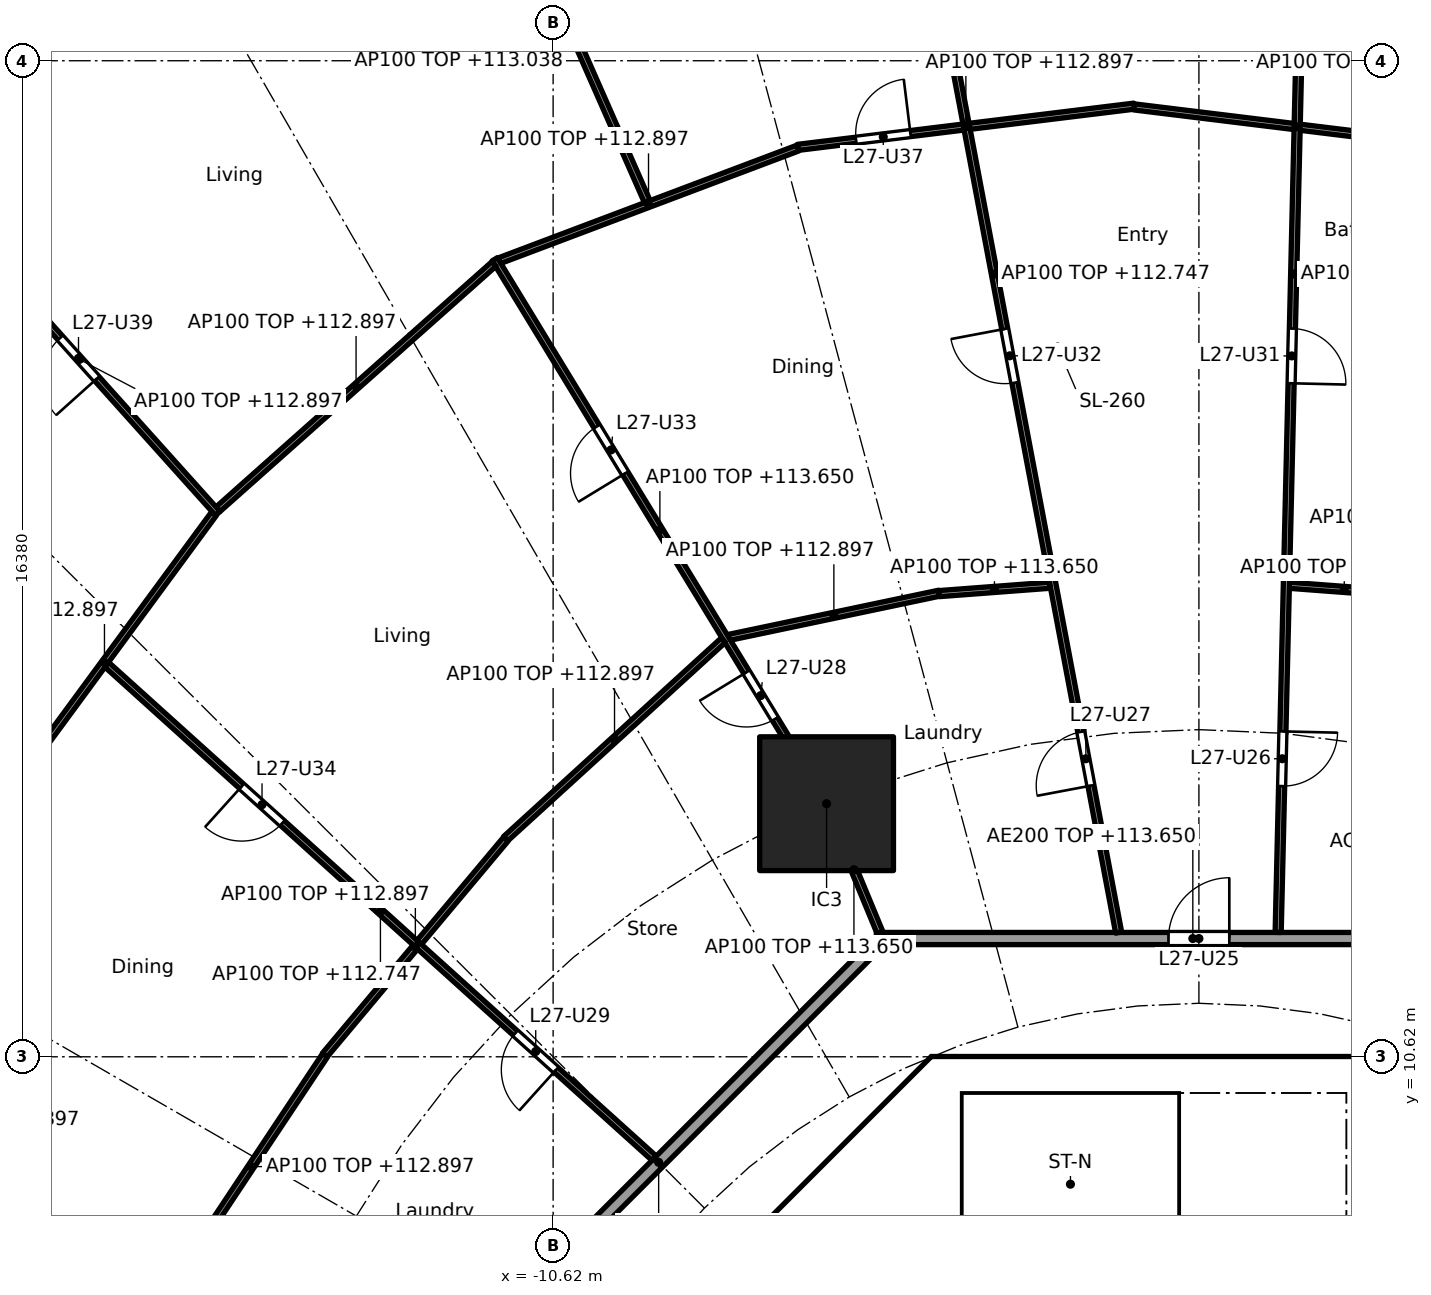
"""IFC4 building model, lengths in metres.
Left out: names, types, materials, properties, quantities, classifications, styles, units other than length and angle.
Written with IfcOpenShell. Run it as: python <this file> out.ifc"""

import sys

from ifc_helpers import new_model, si_unit, direction, frame, frame_2d, origin, origin_2d, place, context, subcontext, project, spatial, polyline, rectangle, outline, extrude, element, fill, save


model = new_model("IFC4")
c1 = context("Model", 3, precision=1e-05, world=origin(), true_north=direction((0.0, 1.0)))
c2 = subcontext(c1, "Body", "Model", "MODEL_VIEW")
j1 = project(units=[si_unit("LENGTHUNIT", "METRE"), si_unit("PLANEANGLEUNIT", "RADIAN")], contexts=[c1])
p1 = place(None, origin())
s1 = spatial("IfcSite", under=j1, at=p1, CompositionType="ELEMENT")
p2 = place(p1, origin())
s2 = spatial("IfcBuilding", under=s1, at=p2, CompositionType="ELEMENT")
p3 = place(p2, frame((0.0, 0.0, 110.3)))
s3 = spatial("IfcBuildingStorey", under=s2, at=p3, CompositionType="ELEMENT", Elevation=110.3)
p4 = place(p3, frame((-6.123, 14.782, 0.0), z_axis=(0.0, 0.0, 1.0), x_axis=(1.0, 0.0, 0.0)))
e1 = element("IfcColumn", 1, at=p4, inside=s3, PredefinedType="COLUMN", context=c2, shape_type="SweptSolid", body=[
    extrude(rectangle(XDim=2.2, YDim=2.2, at=origin_2d()), origin(), (0.0, 0.0, 1.0), 3.7),
])
p5 = place(p3, frame((-4.613, 9.988, 0.0), z_axis=(0.0, 0.0, 1.0), x_axis=(-0.707106781187, -0.707106781187, 0.0)))
e2 = element("IfcWall", 2, at=p5, inside=s3, PredefinedType="SHEAR", context=c2, shape_type="SweptSolid", body=[
    extrude(rectangle(XDim=7.602, YDim=0.6, at=frame_2d((3.801, 0.0))), origin(), (0.0, 0.0, 1.0), 3.35),
])
p6 = place(p5, frame((0.351, 0.0, 0.0)))
e3 = element("IfcOpeningElement", 3, at=p6, cuts=e2, PredefinedType="OPENING", context=c2, shape_type="SweptSolid", body=[
    extrude(rectangle(XDim=1.1, YDim=2.1, at=frame_2d((0.55, 1.05))), frame((0.0, 0.31, 0.0), z_axis=(0.0, -1.0, 0.0), x_axis=(1.0, 0.0, 0.0)), (0.0, 0.0, 1.0), 0.62),
])
p7 = place(p3, frame((-5.8, 4.3, 0.0), z_axis=(0.0, 0.0, 1.0), x_axis=(0.0, 1.0, 0.0)))
e4 = element("IfcWall", 4, at=p7, inside=s3, PredefinedType="PARTITIONING", context=c2, shape_type="SweptSolid", body=[
    extrude(rectangle(XDim=3.927, YDim=0.15, at=frame_2d((1.963, 0.0))), origin(), (0.0, 0.0, 1.0), 3.35),
])
p8 = place(p7, frame((0.413, 0.0, 0.0)))
e5 = element("IfcOpeningElement", 5, at=p8, cuts=e4, PredefinedType="OPENING", context=c2, shape_type="SweptSolid", body=[
    extrude(rectangle(XDim=0.9, YDim=2.1, at=frame_2d((0.45, 1.05))), frame((0.0, 0.085, 0.0), z_axis=(0.0, -1.0, 0.0), x_axis=(1.0, 0.0, 0.0)), (0.0, 0.0, 1.0), 0.17),
])
p9 = place(p7, frame((2.489, 0.0, 0.0)))
e6 = element("IfcOpeningElement", 6, at=p9, cuts=e4, PredefinedType="OPENING", context=c2, shape_type="SweptSolid", body=[
    extrude(rectangle(XDim=0.9, YDim=2.1, at=frame_2d((0.45, 1.05))), frame((0.0, 0.085, 0.0), z_axis=(0.0, -1.0, 0.0), x_axis=(1.0, 0.0, 0.0)), (0.0, 0.0, 1.0), 0.17),
])
p10 = place(p3, origin())
e7 = element("IfcWall", 7, at=p10, inside=s3, PredefinedType="SHEAR", context=c2, shape_type="SweptSolid", body=[
    extrude(outline(polyline([(-4.152, 10.025), (-4.401, 9.776), (-4.825, 10.2), (-4.401, 10.625), (4.401, 10.625), (4.825, 10.2), (4.401, 9.776), (4.152, 10.025), (-4.152, 10.025)])), origin(), (0.0, 0.0, 1.0), 3.35),
])
p11 = place(p3, origin())
e8 = element("IfcWall", 8, at=p11, inside=s3, PredefinedType="SOLIDWALL", context=c2, shape_type="SweptSolid", body=[
    extrude(outline(polyline([(-3.9, 7.025), (-4.1, 7.025), (-4.1, 10.025), (-3.9, 10.025), (-3.9, 7.025)])), origin(), (0.0, 0.0, 1.0), 3.35),
])
p12 = place(p3, frame((-14.829, 6.14, 0.0), z_axis=(0.0, 0.0, 1.0), x_axis=(-0.936597324342, 0.35040755134, 0.0)))
e9 = element("IfcWall", 9, at=p12, inside=s3, PredefinedType="PARTITIONING", context=c2, shape_type="SweptSolid", body=[
    extrude(rectangle(XDim=13.606, YDim=0.2, at=frame_2d((6.803, 0.0))), origin(), (0.0, 0.0, 1.0), 2.597),
])
p13 = place(p3, frame((5.104, 12.565, 0.0), z_axis=(0.0, 0.0, 1.0), x_axis=(-1.0, 0.0, 0.0)))
e10 = element("IfcWall", 10, at=p13, inside=s3, PredefinedType="PARTITIONING", context=c2, shape_type="SweptSolid", body=[
    extrude(rectangle(XDim=10.409, YDim=0.2, at=frame_2d((5.205, 0.0))), origin(), (0.0, 0.0, 1.0), 3.35),
])
p14 = place(p13, frame((4.604, 0.0, 0.0)))
e11 = element("IfcOpeningElement", 11, at=p14, cuts=e10, PredefinedType="OPENING", context=c2, shape_type="SweptSolid", body=[
    extrude(rectangle(XDim=1.0, YDim=2.1, at=frame_2d((0.5, 1.05))), frame((0.0, 0.11, 0.0), z_axis=(0.0, -1.0, 0.0), x_axis=(1.0, 0.0, 0.0)), (0.0, 0.0, 1.0), 0.22),
])
p15 = place(p3, frame((-5.275, 12.494, 0.0), z_axis=(0.0, 0.0, 1.0), x_axis=(-0.707106781187, -0.707106781187, 0.0)))
e12 = element("IfcWall", 12, at=p15, inside=s3, PredefinedType="PARTITIONING", context=c2, shape_type="SweptSolid", body=[
    extrude(rectangle(XDim=10.209, YDim=0.2, at=frame_2d((5.104, 0.0))), origin(), (0.0, 0.0, 1.0), 3.35),
])
p16 = place(p3, frame((3.299, 18.237, 0.0), z_axis=(0.0, 0.0, 1.0), x_axis=(-0.997152920483, 0.075405922664, 0.0)))
e13 = element("IfcWall", 13, at=p16, inside=s3, PredefinedType="PARTITIONING", context=c2, shape_type="SweptSolid", body=[
    extrude(rectangle(XDim=1.823, YDim=0.1, at=frame_2d((0.911, 0.0))), origin(), (0.0, 0.0, 1.0), 2.597),
])
p17 = place(p3, frame((4.267, 25.587, 0.0), z_axis=(0.0, 0.0, 1.0), x_axis=(-0.992576206119, 0.121624319302, 0.0)))
e14 = element("IfcWall", 14, at=p17, inside=s3, PredefinedType="PARTITIONING", context=c2, shape_type="SweptSolid", body=[
    extrude(rectangle(XDim=5.374, YDim=0.1, at=frame_2d((2.687, 0.0))), origin(), (0.0, 0.0, 1.0), 2.597),
])
p18 = place(p3, frame((1.303, 12.665, 0.0), z_axis=(0.0, 0.0, 1.0), x_axis=(0.023564110689, 0.999722327793, 0.0)))
e15 = element("IfcWall", 15, at=p18, inside=s3, PredefinedType="PARTITIONING", context=c2, shape_type="SweptSolid", body=[
    extrude(rectangle(XDim=21.664, YDim=0.1, at=frame_2d((10.832, 0.0))), origin(), (0.0, 0.0, 1.0), 2.447),
])
p19 = place(p18, frame((2.407, 0.0, 0.0)))
e16 = element("IfcOpeningElement", 16, at=p19, cuts=e15, PredefinedType="OPENING", context=c2, shape_type="SweptSolid", body=[
    extrude(rectangle(XDim=0.9, YDim=2.1, at=frame_2d((0.45, 1.05))), frame((0.0, 0.06, 0.0), z_axis=(0.0, -1.0, 0.0), x_axis=(1.0, 0.0, 0.0)), (0.0, 0.0, 1.0), 0.12),
])
p20 = place(p18, frame((9.034, 0.0, 0.0)))
e17 = element("IfcOpeningElement", 17, at=p20, cuts=e15, PredefinedType="OPENING", context=c2, shape_type="SweptSolid", body=[
    extrude(rectangle(XDim=0.9, YDim=2.1, at=frame_2d((0.45, 1.05))), frame((0.0, 0.06, 0.0), z_axis=(0.0, -1.0, 0.0), x_axis=(1.0, 0.0, 0.0)), (0.0, 0.0, 1.0), 0.12),
])
p21 = place(p18, frame((17.009, 0.0, 0.0)))
e18 = element("IfcOpeningElement", 18, at=p21, cuts=e15, PredefinedType="OPENING", context=c2, shape_type="SweptSolid", body=[
    extrude(rectangle(XDim=0.9, YDim=2.1, at=frame_2d((0.45, 1.05))), frame((0.0, 0.06, 0.0), z_axis=(0.0, -1.0, 0.0), x_axis=(1.0, 0.0, 0.0)), (0.0, 0.0, 1.0), 0.12),
])
p22 = place(p3, frame((-1.066, 26.253, 0.0), z_axis=(0.0, 0.0, 1.0), x_axis=(-0.992574197255, -0.121640712523, 0.0)))
e19 = element("IfcWall", 19, at=p22, inside=s3, PredefinedType="PARTITIONING", context=c2, shape_type="SweptSolid", body=[
    extrude(rectangle(XDim=5.574, YDim=0.1, at=frame_2d((2.787, 0.0))), origin(), (0.0, 0.0, 1.0), 2.597),
])
p23 = place(p22, frame((3.705, 0.0, 0.0)))
e20 = element("IfcOpeningElement", 20, at=p23, cuts=e19, PredefinedType="OPENING", context=c2, shape_type="SweptSolid", body=[
    extrude(rectangle(XDim=0.9, YDim=2.1, at=frame_2d((0.45, 1.05))), frame((0.0, 0.06, 0.0), z_axis=(0.0, -1.0, 0.0), x_axis=(1.0, 0.0, 0.0)), (0.0, 0.0, 1.0), 0.12),
])
p24 = place(p3, frame((-1.32, 12.663, 0.0), z_axis=(0.0, 0.0, 1.0), x_axis=(-0.185450638662, 0.982653581187, 0.0)))
e21 = element("IfcWall", 21, at=p24, inside=s3, PredefinedType="PARTITIONING", context=c2, shape_type="SweptSolid", body=[
    extrude(rectangle(XDim=22.043, YDim=0.1, at=frame_2d((11.021, 0.0))), origin(), (0.0, 0.0, 1.0), 2.447),
])
p25 = place(p24, frame((2.458, 0.0, 0.0)))
e22 = element("IfcOpeningElement", 22, at=p25, cuts=e21, PredefinedType="OPENING", context=c2, shape_type="SweptSolid", body=[
    extrude(rectangle(XDim=0.9, YDim=2.1, at=frame_2d((0.45, 1.05))), frame((0.0, 0.06, 0.0), z_axis=(0.0, -1.0, 0.0), x_axis=(1.0, 0.0, 0.0)), (0.0, 0.0, 1.0), 0.12),
])
p26 = place(p24, frame((9.202, 0.0, 0.0)))
e23 = element("IfcOpeningElement", 23, at=p26, cuts=e21, PredefinedType="OPENING", context=c2, shape_type="SweptSolid", body=[
    extrude(rectangle(XDim=0.9, YDim=2.1, at=frame_2d((0.45, 1.05))), frame((0.0, 0.06, 0.0), z_axis=(0.0, -1.0, 0.0), x_axis=(1.0, 0.0, 0.0)), (0.0, 0.0, 1.0), 0.12),
])
p27 = place(p3, frame((-2.453, 18.374, 0.0), z_axis=(0.0, 0.0, 1.0), x_axis=(-0.997153681897, -0.075395853197, 0.0)))
e24 = element("IfcWall", 24, at=p27, inside=s3, PredefinedType="PARTITIONING", context=c2, shape_type="SweptSolid", body=[
    extrude(rectangle(XDim=1.823, YDim=0.1, at=frame_2d((0.912, 0.0))), origin(), (0.0, 0.0, 1.0), 3.35),
])
p28 = place(p3, frame((-4.272, 18.243, 0.0), z_axis=(0.0, 0.0, 1.0), x_axis=(-0.978622947907, -0.205662650547, 0.0)))
e25 = element("IfcWall", 25, at=p28, inside=s3, PredefinedType="PARTITIONING", context=c2, shape_type="SweptSolid", body=[
    extrude(rectangle(XDim=3.538, YDim=0.1, at=frame_2d((1.769, 0.0))), origin(), (0.0, 0.0, 1.0), 2.597),
])
p29 = place(p3, frame((-6.596, 25.563, 0.0), z_axis=(0.0, 0.0, 1.0), x_axis=(-0.9356162121, -0.353018843201, 0.0)))
e26 = element("IfcWall", 26, at=p29, inside=s3, PredefinedType="PARTITIONING", context=c2, shape_type="SweptSolid", body=[
    extrude(rectangle(XDim=5.249, YDim=0.1, at=frame_2d((2.625, 0.0))), origin(), (0.0, 0.0, 1.0), 2.597),
])
p30 = place(p3, frame((-9.072, 24.683, 0.0), z_axis=(0.0, 0.0, 1.0), x_axis=(-0.403192911159, 0.915115007194, 0.0)))
e27 = element("IfcWall", 27, at=p30, inside=s3, PredefinedType="PARTITIONING", context=c2, shape_type="SweptSolid", body=[
    extrude(rectangle(XDim=8.211, YDim=0.1, at=frame_2d((4.106, 0.0))), origin(), (0.0, 0.0, 1.0), 2.738),
])
p31 = place(p30, frame((3.656, 0.0, 0.0)))
e28 = element("IfcOpeningElement", 28, at=p31, cuts=e27, PredefinedType="OPENING", context=c2, shape_type="SweptSolid", body=[
    extrude(rectangle(XDim=0.9, YDim=2.1, at=frame_2d((0.45, 1.05))), frame((0.0, 0.06, 0.0), z_axis=(0.0, -1.0, 0.0), x_axis=(1.0, 0.0, 0.0)), (0.0, 0.0, 1.0), 0.12),
])
p32 = place(p3, frame((-5.243, 12.657, 0.0), z_axis=(0.0, 0.0, 1.0), x_axis=(-0.382703272338, 0.923871314276, 0.0)))
e29 = element("IfcWall", 29, at=p32, inside=s3, PredefinedType="PARTITIONING", context=c2, shape_type="SweptSolid", body=[
    extrude(rectangle(XDim=2.249, YDim=0.1, at=frame_2d((1.125, 0.0))), origin(), (0.0, 0.0, 1.0), 3.35),
])
p33 = place(p3, frame((-6.149, 14.825, 0.0), z_axis=(0.0, 0.0, 1.0), x_axis=(-0.520411490252, 0.853915616917, 0.0)))
e30 = element("IfcWall", 30, at=p33, inside=s3, PredefinedType="PARTITIONING", context=c2, shape_type="SweptSolid", body=[
    extrude(rectangle(XDim=10.435, YDim=0.1, at=frame_2d((5.218, 0.0))), origin(), (0.0, 0.0, 1.0), 3.35),
])
p34 = place(p33, frame((1.582, 0.0, 0.0)))
e31 = element("IfcOpeningElement", 31, at=p34, cuts=e30, PredefinedType="OPENING", context=c2, shape_type="SweptSolid", body=[
    extrude(rectangle(XDim=0.9, YDim=2.1, at=frame_2d((0.45, 1.05))), frame((0.0, 0.06, 0.0), z_axis=(0.0, -1.0, 0.0), x_axis=(1.0, 0.0, 0.0)), (0.0, 0.0, 1.0), 0.12),
])
p35 = place(p33, frame((6.312, 0.0, 0.0)))
e32 = element("IfcOpeningElement", 32, at=p35, cuts=e30, PredefinedType="OPENING", context=c2, shape_type="SweptSolid", body=[
    extrude(rectangle(XDim=0.9, YDim=2.1, at=frame_2d((0.45, 1.05))), frame((0.0, 0.06, 0.0), z_axis=(0.0, -1.0, 0.0), x_axis=(1.0, 0.0, 0.0)), (0.0, 0.0, 1.0), 0.12),
])
p36 = place(p3, frame((-7.82, 17.472, 0.0), z_axis=(0.0, 0.0, 1.0), x_axis=(-0.73885182489, -0.67386792538, 0.0)))
e33 = element("IfcWall", 33, at=p36, inside=s3, PredefinedType="PARTITIONING", context=c2, shape_type="SweptSolid", body=[
    extrude(rectangle(XDim=4.846, YDim=0.1, at=frame_2d((2.423, 0.0))), origin(), (0.0, 0.0, 1.0), 2.597),
])
p37 = place(p3, frame((-11.591, 23.66, 0.0), z_axis=(0.0, 0.0, 1.0), x_axis=(-0.747429278403, -0.664341383466, 0.0)))
e34 = element("IfcWall", 34, at=p37, inside=s3, PredefinedType="PARTITIONING", context=c2, shape_type="SweptSolid", body=[
    extrude(rectangle(XDim=6.073, YDim=0.1, at=frame_2d((3.037, 0.0))), origin(), (0.0, 0.0, 1.0), 2.597),
])
p38 = place(p3, frame((-11.396, 14.202, 0.0), z_axis=(0.0, 0.0, 1.0), x_axis=(-0.642475660273, -0.766306091557, 0.0)))
e35 = element("IfcWall", 35, at=p38, inside=s3, PredefinedType="PARTITIONING", context=c2, shape_type="SweptSolid", body=[
    extrude(rectangle(XDim=4.637, YDim=0.1, at=frame_2d((2.319, 0.0))), origin(), (0.0, 0.0, 1.0), 2.597),
])
p39 = place(p3, frame((-16.134, 19.554, 0.0), z_axis=(0.0, 0.0, 1.0), x_axis=(-0.667985610263, 0.74417418961, 0.0)))
e36 = element("IfcWall", 36, at=p39, inside=s3, PredefinedType="PARTITIONING", context=c2, shape_type="SweptSolid", body=[
    extrude(rectangle(XDim=6.809, YDim=0.1, at=frame_2d((3.405, 0.0))), origin(), (0.0, 0.0, 1.0), 2.597),
])
p40 = place(p39, frame((2.98, 0.0, 0.0)))
e37 = element("IfcOpeningElement", 37, at=p40, cuts=e36, PredefinedType="OPENING", context=c2, shape_type="SweptSolid", body=[
    extrude(rectangle(XDim=0.9, YDim=2.1, at=frame_2d((0.45, 1.05))), frame((0.0, 0.06, 0.0), z_axis=(0.0, -1.0, 0.0), x_axis=(1.0, 0.0, 0.0)), (0.0, 0.0, 1.0), 0.12),
])
p41 = place(p3, frame((-16.197, 19.551, 0.0), z_axis=(0.0, 0.0, 1.0), x_axis=(-0.592391983588, -0.80564988536, 0.0)))
e38 = element("IfcWall", 38, at=p41, inside=s3, PredefinedType="PARTITIONING", context=c2, shape_type="SweptSolid", body=[
    extrude(rectangle(XDim=6.08, YDim=0.1, at=frame_2d((3.04, 0.0))), origin(), (0.0, 0.0, 1.0), 2.597),
])
p42 = place(p3, frame((-8.959, 8.952, 0.0), z_axis=(0.0, 0.0, 1.0), x_axis=(-0.742679904999, 0.669646592398, 0.0)))
e39 = element("IfcWall", 39, at=p42, inside=s3, PredefinedType="PARTITIONING", context=c2, shape_type="SweptSolid", body=[
    extrude(rectangle(XDim=12.121, YDim=0.1, at=frame_2d((6.061, 0.0))), origin(), (0.0, 0.0, 1.0), 2.447),
])
p43 = place(p42, frame((2.172, 0.0, 0.0)))
e40 = element("IfcOpeningElement", 40, at=p43, cuts=e39, PredefinedType="OPENING", context=c2, shape_type="SweptSolid", body=[
    extrude(rectangle(XDim=0.9, YDim=2.1, at=frame_2d((0.45, 1.05))), frame((0.0, 0.06, 0.0), z_axis=(0.0, -1.0, 0.0), x_axis=(1.0, 0.0, 0.0)), (0.0, 0.0, 1.0), 0.12),
])
p44 = place(p42, frame((8.233, 0.0, 0.0)))
e41 = element("IfcOpeningElement", 41, at=p44, cuts=e39, PredefinedType="OPENING", context=c2, shape_type="SweptSolid", body=[
    extrude(rectangle(XDim=0.9, YDim=2.1, at=frame_2d((0.45, 1.05))), frame((0.0, 0.06, 0.0), z_axis=(0.0, -1.0, 0.0), x_axis=(1.0, 0.0, 0.0)), (0.0, 0.0, 1.0), 0.12),
])
p45 = place(p3, frame((-14.371, 10.645, 0.0), z_axis=(0.0, 0.0, 1.0), x_axis=(-0.553341009285, -0.832954817168, 0.0)))
e42 = element("IfcWall", 42, at=p45, inside=s3, PredefinedType="PARTITIONING", context=c2, shape_type="SweptSolid", body=[
    extrude(rectangle(XDim=4.396, YDim=0.1, at=frame_2d((2.198, 0.0))), origin(), (0.0, 0.0, 1.0), 2.597),
])
p46 = place(p6, origin())
e43 = element("IfcDoor", 43, at=p46, inside=s3, OperationType="SINGLE_SWING_RIGHT", PredefinedType="DOOR", context=c2, shape_type="SweptSolid", body=[
    extrude(rectangle(XDim=1.1, YDim=2.1, at=frame_2d((0.55, 1.05))), frame((0.0, 0.025, 0.0), z_axis=(0.0, -1.0, 0.0), x_axis=(1.0, 0.0, 0.0)), (0.0, 0.0, 1.0), 0.05),
])
fill(e3, e43)
p47 = place(p14, frame((1.0, 0.0, 0.0), x_axis=(-1.0, 0.0, 0.0)))
e44 = element("IfcDoor", 44, at=p47, inside=s3, OperationType="SINGLE_SWING_RIGHT", PredefinedType="DOOR", context=c2, shape_type="SweptSolid", body=[
    extrude(rectangle(XDim=1.0, YDim=2.1, at=frame_2d((0.5, 1.05))), frame((0.0, 0.025, 0.0), z_axis=(0.0, -1.0, 0.0), x_axis=(1.0, 0.0, 0.0)), (0.0, 0.0, 1.0), 0.05),
])
fill(e11, e44)
p48 = place(p19, frame((0.9, 0.0, 0.0), x_axis=(-1.0, 0.0, 0.0)))
e45 = element("IfcDoor", 45, at=p48, inside=s3, OperationType="SINGLE_SWING_LEFT", PredefinedType="DOOR", context=c2, shape_type="SweptSolid", body=[
    extrude(rectangle(XDim=0.9, YDim=2.1, at=frame_2d((0.45, 1.05))), frame((0.0, 0.025, 0.0), z_axis=(0.0, -1.0, 0.0), x_axis=(1.0, 0.0, 0.0)), (0.0, 0.0, 1.0), 0.05),
])
fill(e16, e45)
p49 = place(p25, origin())
e46 = element("IfcDoor", 46, at=p49, inside=s3, OperationType="SINGLE_SWING_LEFT", PredefinedType="DOOR", context=c2, shape_type="SweptSolid", body=[
    extrude(rectangle(XDim=0.9, YDim=2.1, at=frame_2d((0.45, 1.05))), frame((0.0, 0.025, 0.0), z_axis=(0.0, -1.0, 0.0), x_axis=(1.0, 0.0, 0.0)), (0.0, 0.0, 1.0), 0.05),
])
fill(e22, e46)
p50 = place(p34, origin())
e47 = element("IfcDoor", 47, at=p50, inside=s3, OperationType="SINGLE_SWING_RIGHT", PredefinedType="DOOR", context=c2, shape_type="SweptSolid", body=[
    extrude(rectangle(XDim=0.9, YDim=2.1, at=frame_2d((0.45, 1.05))), frame((0.0, 0.025, 0.0), z_axis=(0.0, -1.0, 0.0), x_axis=(1.0, 0.0, 0.0)), (0.0, 0.0, 1.0), 0.05),
])
fill(e31, e47)
p51 = place(p43, origin())
e48 = element("IfcDoor", 48, at=p51, inside=s3, OperationType="SINGLE_SWING_LEFT", PredefinedType="DOOR", context=c2, shape_type="SweptSolid", body=[
    extrude(rectangle(XDim=0.9, YDim=2.1, at=frame_2d((0.45, 1.05))), frame((0.0, 0.025, 0.0), z_axis=(0.0, -1.0, 0.0), x_axis=(1.0, 0.0, 0.0)), (0.0, 0.0, 1.0), 0.05),
])
fill(e40, e48)
p52 = place(p20, frame((0.9, 0.0, 0.0), x_axis=(-1.0, 0.0, 0.0)))
e49 = element("IfcDoor", 49, at=p52, inside=s3, OperationType="SINGLE_SWING_RIGHT", PredefinedType="DOOR", context=c2, shape_type="SweptSolid", body=[
    extrude(rectangle(XDim=0.9, YDim=2.1, at=frame_2d((0.45, 1.05))), frame((0.0, 0.025, 0.0), z_axis=(0.0, -1.0, 0.0), x_axis=(1.0, 0.0, 0.0)), (0.0, 0.0, 1.0), 0.05),
])
fill(e17, e49)
p53 = place(p26, origin())
e50 = element("IfcDoor", 50, at=p53, inside=s3, OperationType="SINGLE_SWING_RIGHT", PredefinedType="DOOR", context=c2, shape_type="SweptSolid", body=[
    extrude(rectangle(XDim=0.9, YDim=2.1, at=frame_2d((0.45, 1.05))), frame((0.0, 0.025, 0.0), z_axis=(0.0, -1.0, 0.0), x_axis=(1.0, 0.0, 0.0)), (0.0, 0.0, 1.0), 0.05),
])
fill(e23, e50)
p54 = place(p35, origin())
e51 = element("IfcDoor", 51, at=p54, inside=s3, OperationType="SINGLE_SWING_LEFT", PredefinedType="DOOR", context=c2, shape_type="SweptSolid", body=[
    extrude(rectangle(XDim=0.9, YDim=2.1, at=frame_2d((0.45, 1.05))), frame((0.0, 0.025, 0.0), z_axis=(0.0, -1.0, 0.0), x_axis=(1.0, 0.0, 0.0)), (0.0, 0.0, 1.0), 0.05),
])
fill(e32, e51)
p55 = place(p44, origin())
e52 = element("IfcDoor", 52, at=p55, inside=s3, OperationType="SINGLE_SWING_RIGHT", PredefinedType="DOOR", context=c2, shape_type="SweptSolid", body=[
    extrude(rectangle(XDim=0.9, YDim=2.1, at=frame_2d((0.45, 1.05))), frame((0.0, 0.025, 0.0), z_axis=(0.0, -1.0, 0.0), x_axis=(1.0, 0.0, 0.0)), (0.0, 0.0, 1.0), 0.05),
])
fill(e41, e52)
p56 = place(p23, frame((0.9, 0.0, 0.0), x_axis=(-1.0, 0.0, 0.0)))
e53 = element("IfcDoor", 53, at=p56, inside=s3, OperationType="SINGLE_SWING_RIGHT", PredefinedType="DOOR", context=c2, shape_type="SweptSolid", body=[
    extrude(rectangle(XDim=0.9, YDim=2.1, at=frame_2d((0.45, 1.05))), frame((0.0, 0.025, 0.0), z_axis=(0.0, -1.0, 0.0), x_axis=(1.0, 0.0, 0.0)), (0.0, 0.0, 1.0), 0.05),
])
fill(e20, e53)
p57 = place(p40, origin())
e54 = element("IfcDoor", 54, at=p57, inside=s3, OperationType="SINGLE_SWING_LEFT", PredefinedType="DOOR", context=c2, shape_type="SweptSolid", body=[
    extrude(rectangle(XDim=0.9, YDim=2.1, at=frame_2d((0.45, 1.05))), frame((0.0, 0.025, 0.0), z_axis=(0.0, -1.0, 0.0), x_axis=(1.0, 0.0, 0.0)), (0.0, 0.0, 1.0), 0.05),
])
fill(e37, e54)
save(model, sys.argv[1])
